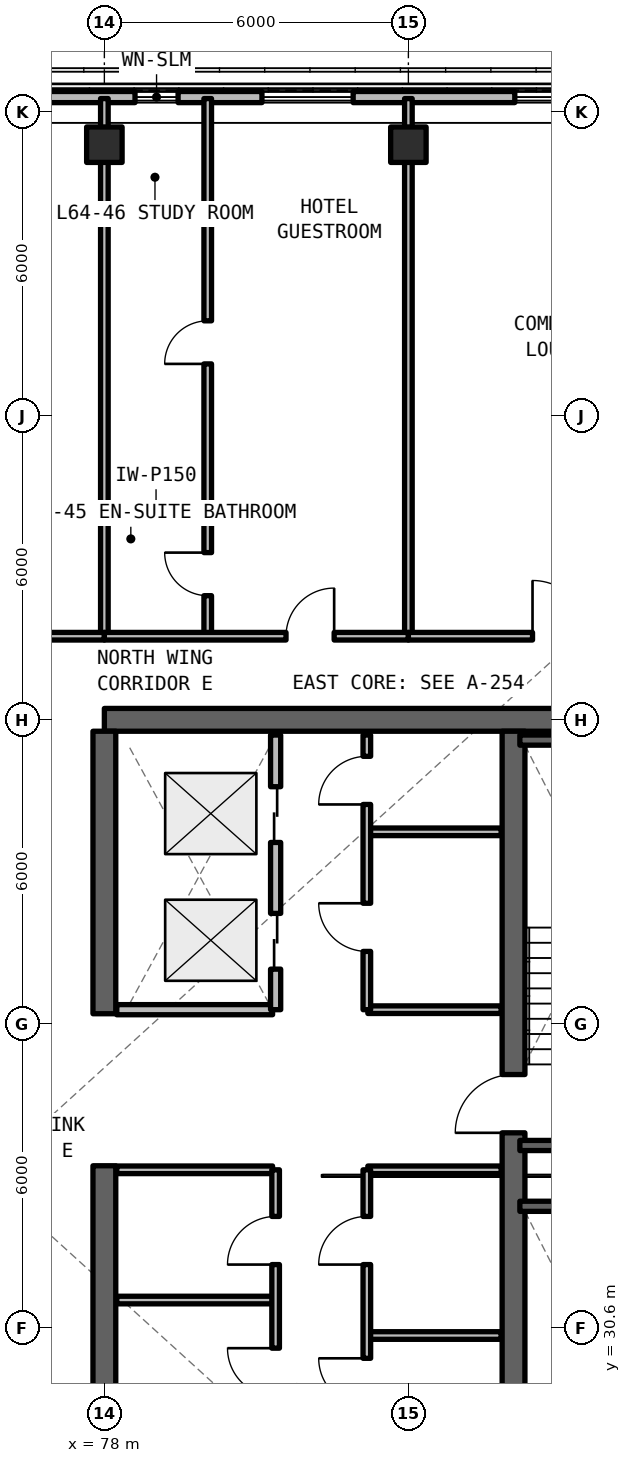
"""IFC4 building model, lengths in metres.
Left out: names, types, materials, properties, quantities, classifications, styles, units other than length and angle.
Written with IfcOpenShell. Run it as: python <this file> out.ifc"""

import sys

from ifc_helpers import new_model, si_unit, direction, frame, frame_2d, origin, origin_2d, place, context, subcontext, project, spatial, rectangle, extrude, element, fill, save


model = new_model("IFC4")
c1 = context("Model", 3, precision=1e-05, world=origin(), true_north=direction((0.0, 1.0)))
c2 = subcontext(c1, "Body", "Model", "MODEL_VIEW")
j1 = project(units=[si_unit("LENGTHUNIT", "METRE"), si_unit("PLANEANGLEUNIT", "RADIAN")], contexts=[c1])
p1 = place(None, origin())
s1 = spatial("IfcSite", under=j1, at=p1, CompositionType="ELEMENT")
p2 = place(p1, origin())
s2 = spatial("IfcBuilding", under=s1, at=p2, CompositionType="ELEMENT")
p3 = place(p2, frame((0.0, 0.0, 229.35)))
s3 = spatial("IfcBuildingStorey", under=s2, at=p3, CompositionType="ELEMENT", Elevation=229.35)
p4 = place(p3, frame((90.0, 42.6, 0.0), z_axis=(0.0, 0.0, 1.0), x_axis=(-1.0, 0.0, 0.0)))
e1 = element("IfcWall", 1, at=p4, inside=s3, PredefinedType="SHEAR", context=c2, shape_type="SweptSolid", body=[
    extrude(rectangle(XDim=12.0, YDim=0.45, at=frame_2d((6.0, 0.0))), origin(), (0.0, 0.0, 1.0), 3.3),
])
p5 = place(p3, frame((78.0, 24.825, 0.0), z_axis=(0.0, 0.0, 1.0), x_axis=(0.0, 1.0, 0.0)))
e2 = element("IfcWall", 2, at=p5, inside=s3, PredefinedType="SHEAR", context=c2, shape_type="SweptSolid", body=[
    extrude(rectangle(XDim=8.975, YDim=0.45, at=frame_2d((4.488, 0.0))), origin(), (0.0, 0.0, 1.0), 3.3),
])
p6 = place(p3, frame((78.0, 36.8, 0.0), z_axis=(0.0, 0.0, 1.0), x_axis=(0.0, 1.0, 0.0)))
e3 = element("IfcWall", 3, at=p6, inside=s3, PredefinedType="SHEAR", context=c2, shape_type="SweptSolid", body=[
    extrude(rectangle(XDim=5.575, YDim=0.45, at=frame_2d((2.788, 0.0))), origin(), (0.0, 0.0, 1.0), 3.3),
])
p7 = place(p3, frame((86.075, 24.825, 0.0), z_axis=(0.0, 0.0, 1.0), x_axis=(0.0, 1.0, 0.0)))
e4 = element("IfcWall", 4, at=p7, inside=s3, PredefinedType="SHEAR", context=c2, shape_type="SweptSolid", body=[
    extrude(rectangle(XDim=17.55, YDim=0.45, at=frame_2d((8.775, 0.0))), origin(), (0.0, 0.0, 1.0), 3.3),
])
p8 = place(p7, frame((0.425, 0.0, 0.0)))
e5 = element("IfcOpeningElement", 5, at=p8, cuts=e4, PredefinedType="OPENING", context=c2, shape_type="SweptSolid", body=[
    extrude(rectangle(XDim=1.15, YDim=2.15, at=frame_2d((0.575, 1.075))), frame((0.0, 0.235, 0.0), z_axis=(0.0, -1.0, 0.0), x_axis=(1.0, 0.0, 0.0)), (0.0, 0.0, 1.0), 0.47),
])
p9 = place(p7, frame((9.625, 0.0, 0.0)))
e6 = element("IfcOpeningElement", 6, at=p9, cuts=e4, PredefinedType="OPENING", context=c2, shape_type="SweptSolid", body=[
    extrude(rectangle(XDim=1.15, YDim=2.15, at=frame_2d((0.575, 1.075))), frame((0.0, 0.235, 0.0), z_axis=(0.0, -1.0, 0.0), x_axis=(1.0, 0.0, 0.0)), (0.0, 0.0, 1.0), 0.47),
])
for number, where, z_axis, x_axis in (
    (7, (78.0, 53.95, 0.0), (0.0, 0.0, 1.0), (1.0, 0.0, 0.0)),
    (8, (84.0, 53.95, 0.0), (0.0, 0.0, 1.0), (1.0, 0.0, 0.0)),
):
    element("IfcColumn", number, at=place(p3, frame(where, z_axis=z_axis, x_axis=x_axis)), inside=s3, PredefinedType="COLUMN", context=c2, shape_type="SweptSolid", body=[
        extrude(rectangle(XDim=0.7, YDim=0.7, at=origin_2d()), origin(), (0.0, 0.0, 1.0), 3.3),
    ])
p10 = place(p3, frame((94.754, 54.89, 0.0), z_axis=(0.0, 0.0, 1.0), x_axis=(-1.0, 0.0, 0.0)))
e9 = element("IfcWall", 9, at=p10, inside=s3, PredefinedType="SOLIDWALL", context=c2, shape_type="SweptSolid", body=[
    extrude(rectangle(XDim=23.609, YDim=0.22, at=frame_2d((11.804, 0.0))), origin(), (0.0, 0.0, 1.0), 3.08),
])
p11 = place(p10, frame((1.427, 0.0, 0.78)))
e10 = element("IfcOpeningElement", 10, at=p11, cuts=e9, PredefinedType="OPENING", context=c2, shape_type="SweptSolid", body=[
    extrude(rectangle(XDim=1.8, YDim=1.66, at=frame_2d((0.9, 0.83))), frame((0.0, 0.12, 0.0), z_axis=(0.0, -1.0, 0.0), x_axis=(1.0, 0.0, 0.0)), (0.0, 0.0, 1.0), 0.24),
])
p12 = place(p10, frame((18.854, 0.0, 0.78)))
e11 = element("IfcOpeningElement", 11, at=p12, cuts=e9, PredefinedType="OPENING", context=c2, shape_type="SweptSolid", body=[
    extrude(rectangle(XDim=1.8, YDim=1.66, at=frame_2d((0.9, 0.83))), frame((0.0, 0.12, 0.0), z_axis=(0.0, -1.0, 0.0), x_axis=(1.0, 0.0, 0.0)), (0.0, 0.0, 1.0), 0.24),
])
p13 = place(p10, frame((15.299, 0.0, 0.78)))
e12 = element("IfcOpeningElement", 12, at=p13, cuts=e9, PredefinedType="OPENING", context=c2, shape_type="SweptSolid", body=[
    extrude(rectangle(XDim=0.85, YDim=1.65, at=frame_2d((0.425, 0.825))), frame((0.0, 0.12, 0.0), z_axis=(0.0, -1.0, 0.0), x_axis=(1.0, 0.0, 0.0)), (0.0, 0.0, 1.0), 0.24),
])
p14 = place(p10, frame((11.844, 0.0, 0.78)))
e13 = element("IfcOpeningElement", 13, at=p14, cuts=e9, PredefinedType="OPENING", context=c2, shape_type="SweptSolid", body=[
    extrude(rectangle(XDim=1.8, YDim=1.66, at=frame_2d((0.9, 0.83))), frame((0.0, 0.12, 0.0), z_axis=(0.0, -1.0, 0.0), x_axis=(1.0, 0.0, 0.0)), (0.0, 0.0, 1.0), 0.24),
])
p15 = place(p10, frame((6.854, 0.0, 0.78)))
e14 = element("IfcOpeningElement", 14, at=p15, cuts=e9, PredefinedType="OPENING", context=c2, shape_type="SweptSolid", body=[
    extrude(rectangle(XDim=1.8, YDim=1.66, at=frame_2d((0.9, 0.83))), frame((0.0, 0.12, 0.0), z_axis=(0.0, -1.0, 0.0), x_axis=(1.0, 0.0, 0.0)), (0.0, 0.0, 1.0), 0.24),
])
for number, where, z_axis, x_axis in (
    (15, (83.2, 30.45, 0.0), (0.0, 0.0, 1.0), (1.0, 0.0, 0.0)),
    (16, (83.2, 33.72, 0.0), (0.0, 0.0, 1.0), (1.0, 0.0, 0.0)),
):
    element("IfcWall", number, at=place(p3, frame(where, z_axis=z_axis, x_axis=x_axis)), inside=s3, PredefinedType="SOLIDWALL", context=c2, shape_type="SweptSolid", body=[
        extrude(rectangle(XDim=2.63, YDim=0.15, at=frame_2d((1.315, 0.0))), origin(), (0.0, 0.0, 1.0), 2.35),
    ])
p16 = place(p3, frame((83.18, 28.5, 0.0), z_axis=(0.0, 0.0, 1.0), x_axis=(0.0, 1.0, 0.0)))
e17 = element("IfcWall", 17, at=p16, inside=s3, PredefinedType="SOLIDWALL", context=c2, shape_type="SweptSolid", body=[
    extrude(rectangle(XDim=5.22, YDim=0.15, at=frame_2d((2.61, 0.0))), origin(), (0.0, 0.0, 1.0), 2.35),
])
p17 = place(p16, frame((0.55, 0.0, 0.0)))
e18 = element("IfcOpeningElement", 18, at=p17, cuts=e17, PredefinedType="OPENING", context=c2, shape_type="SweptSolid", body=[
    extrude(rectangle(XDim=0.95, YDim=2.15, at=frame_2d((0.475, 1.075))), frame((0.0, 0.085, 0.0), z_axis=(0.0, -1.0, 0.0), x_axis=(1.0, 0.0, 0.0)), (0.0, 0.0, 1.0), 0.17),
])
p18 = place(p16, frame((3.35, 0.0, 0.0)))
e19 = element("IfcOpeningElement", 19, at=p18, cuts=e17, PredefinedType="OPENING", context=c2, shape_type="SweptSolid", body=[
    extrude(rectangle(XDim=0.95, YDim=2.15, at=frame_2d((0.475, 1.075))), frame((0.0, 0.085, 0.0), z_axis=(0.0, -1.0, 0.0), x_axis=(1.0, 0.0, 0.0)), (0.0, 0.0, 1.0), 0.17),
])
for number, where, z_axis, x_axis in (
    (20, (78.245, 31.15, 0.0), (0.0, 0.0, 1.0), (1.0, 0.0, 0.0)),
    (21, (78.245, 33.72, 0.0), (0.0, 0.0, 1.0), (1.0, 0.0, 0.0)),
):
    element("IfcWall", number, at=place(p3, frame(where, z_axis=z_axis, x_axis=x_axis)), inside=s3, PredefinedType="SOLIDWALL", context=c2, shape_type="SweptSolid", body=[
        extrude(rectangle(XDim=3.075, YDim=0.15, at=frame_2d((1.538, 0.0))), origin(), (0.0, 0.0, 1.0), 2.35),
    ])
p19 = place(p3, frame((81.38, 28.5, 0.0), z_axis=(0.0, 0.0, 1.0), x_axis=(0.0, 1.0, 0.0)))
e22 = element("IfcWall", 22, at=p19, inside=s3, PredefinedType="SOLIDWALL", context=c2, shape_type="SweptSolid", body=[
    extrude(rectangle(XDim=5.22, YDim=0.15, at=frame_2d((2.61, 0.0))), origin(), (0.0, 0.0, 1.0), 2.35),
])
p20 = place(p19, frame((0.75, 0.0, 0.0)))
e23 = element("IfcOpeningElement", 23, at=p20, cuts=e22, PredefinedType="OPENING", context=c2, shape_type="SweptSolid", body=[
    extrude(rectangle(XDim=0.95, YDim=2.15, at=frame_2d((0.475, 1.075))), frame((0.0, 0.085, 0.0), z_axis=(0.0, -1.0, 0.0), x_axis=(1.0, 0.0, 0.0)), (0.0, 0.0, 1.0), 0.17),
])
p21 = place(p19, frame((3.35, 0.0, 0.0)))
e24 = element("IfcOpeningElement", 24, at=p21, cuts=e22, PredefinedType="OPENING", context=c2, shape_type="SweptSolid", body=[
    extrude(rectangle(XDim=0.95, YDim=2.15, at=frame_2d((0.475, 1.075))), frame((0.0, 0.085, 0.0), z_axis=(0.0, -1.0, 0.0), x_axis=(1.0, 0.0, 0.0)), (0.0, 0.0, 1.0), 0.17),
])
for number, where, z_axis, x_axis in (
    (25, (83.2, 36.88, 0.0), (0.0, 0.0, 1.0), (1.0, 0.0, 0.0)),
    (26, (83.2, 40.39, 0.0), (0.0, 0.0, 1.0), (1.0, 0.0, 0.0)),
):
    element("IfcWall", number, at=place(p3, frame(where, z_axis=z_axis, x_axis=x_axis)), inside=s3, PredefinedType="SOLIDWALL", context=c2, shape_type="SweptSolid", body=[
        extrude(rectangle(XDim=2.63, YDim=0.15, at=frame_2d((1.315, 0.0))), origin(), (0.0, 0.0, 1.0), 2.35),
    ])
p22 = place(p3, frame((83.18, 36.88, 0.0), z_axis=(0.0, 0.0, 1.0), x_axis=(0.0, 1.0, 0.0)))
e27 = element("IfcWall", 27, at=p22, inside=s3, PredefinedType="SOLIDWALL", context=c2, shape_type="SweptSolid", body=[
    extrude(rectangle(XDim=5.42, YDim=0.15, at=frame_2d((2.71, 0.0))), origin(), (0.0, 0.0, 1.0), 2.35),
])
p23 = place(p22, frame((1.15, 0.0, 0.0)))
e28 = element("IfcOpeningElement", 28, at=p23, cuts=e27, PredefinedType="OPENING", context=c2, shape_type="SweptSolid", body=[
    extrude(rectangle(XDim=0.95, YDim=2.15, at=frame_2d((0.475, 1.075))), frame((0.0, 0.085, 0.0), z_axis=(0.0, -1.0, 0.0), x_axis=(1.0, 0.0, 0.0)), (0.0, 0.0, 1.0), 0.17),
])
p24 = place(p22, frame((4.05, 0.0, 0.0)))
e29 = element("IfcOpeningElement", 29, at=p24, cuts=e27, PredefinedType="OPENING", context=c2, shape_type="SweptSolid", body=[
    extrude(rectangle(XDim=0.95, YDim=2.15, at=frame_2d((0.475, 1.075))), frame((0.0, 0.085, 0.0), z_axis=(0.0, -1.0, 0.0), x_axis=(1.0, 0.0, 0.0)), (0.0, 0.0, 1.0), 0.17),
])
p25 = place(p3, frame((78.245, 36.88, 0.0), z_axis=(0.0, 0.0, 1.0), x_axis=(1.0, 0.0, 0.0)))
e30 = element("IfcWall", 30, at=p25, inside=s3, PredefinedType="SOLIDWALL", context=c2, shape_type="SweptSolid", body=[
    extrude(rectangle(XDim=3.075, YDim=0.2, at=frame_2d((1.538, 0.0))), origin(), (0.0, 0.0, 1.0), 2.35),
])
p26 = place(p3, frame((81.38, 36.88, 0.0), z_axis=(0.0, 0.0, 1.0), x_axis=(0.0, 1.0, 0.0)))
e31 = element("IfcWall", 31, at=p26, inside=s3, PredefinedType="SOLIDWALL", context=c2, shape_type="SweptSolid", body=[
    extrude(rectangle(XDim=5.42, YDim=0.2, at=frame_2d((2.71, 0.0))), origin(), (0.0, 0.0, 1.0), 2.35),
])
p27 = place(p26, frame((0.8, 0.0, 0.0)))
e32 = element("IfcOpeningElement", 32, at=p27, cuts=e31, PredefinedType="OPENING", context=c2, shape_type="SweptSolid", body=[
    extrude(rectangle(XDim=1.1, YDim=2.2, at=frame_2d((0.55, 1.1))), frame((0.0, 0.11, 0.0), z_axis=(0.0, -1.0, 0.0), x_axis=(1.0, 0.0, 0.0)), (0.0, 0.0, 1.0), 0.22),
])
p28 = place(p26, frame((3.3, 0.0, 0.0)))
e33 = element("IfcOpeningElement", 33, at=p28, cuts=e31, PredefinedType="OPENING", context=c2, shape_type="SweptSolid", body=[
    extrude(rectangle(XDim=1.1, YDim=2.2, at=frame_2d((0.55, 1.1))), frame((0.0, 0.11, 0.0), z_axis=(0.0, -1.0, 0.0), x_axis=(1.0, 0.0, 0.0)), (0.0, 0.0, 1.0), 0.22),
])
p29 = place(p3, frame((78.0, 44.25, 0.0), z_axis=(0.0, 0.0, 1.0), x_axis=(0.0, 1.0, 0.0)))
e34 = element("IfcWall", 34, at=p29, inside=s3, PredefinedType="SOLIDWALL", context=c2, shape_type="SweptSolid", body=[
    extrude(rectangle(XDim=10.61, YDim=0.15, at=frame_2d((5.305, 0.0))), origin(), (0.0, 0.0, 1.0), 2.35),
])
p30 = place(p3, frame((72.0, 44.25, 0.0), z_axis=(0.0, 0.0, 1.0), x_axis=(1.0, 0.0, 0.0)))
e35 = element("IfcWall", 35, at=p30, inside=s3, PredefinedType="SOLIDWALL", context=c2, shape_type="SweptSolid", body=[
    extrude(rectangle(XDim=6.0, YDim=0.15, at=frame_2d((3.0, 0.0))), origin(), (0.0, 0.0, 1.0), 2.35),
])
p31 = place(p30, frame((2.525, 0.0, 0.0)))
e36 = element("IfcOpeningElement", 36, at=p31, cuts=e35, PredefinedType="OPENING", context=c2, shape_type="SweptSolid", body=[
    extrude(rectangle(XDim=0.95, YDim=2.15, at=frame_2d((0.475, 1.075))), frame((0.0, 0.085, 0.0), z_axis=(0.0, -1.0, 0.0), x_axis=(1.0, 0.0, 0.0)), (0.0, 0.0, 1.0), 0.17),
])
p32 = place(p3, frame((84.0, 44.25, 0.0), z_axis=(0.0, 0.0, 1.0), x_axis=(0.0, 1.0, 0.0)))
e37 = element("IfcWall", 37, at=p32, inside=s3, PredefinedType="SOLIDWALL", context=c2, shape_type="SweptSolid", body=[
    extrude(rectangle(XDim=10.61, YDim=0.15, at=frame_2d((5.305, 0.0))), origin(), (0.0, 0.0, 1.0), 2.35),
])
p33 = place(p3, frame((78.0, 46.7, 0.0), z_axis=(0.0, 0.0, 1.0), x_axis=(1.0, 0.0, 0.0)))
e38 = element("IfcWall", 38, at=p33, inside=s3, PredefinedType="PARTITIONING", context=c2, shape_type="SweptSolid", body=[
    extrude(rectangle(XDim=2.04, YDim=0.15, at=frame_2d((1.02, 0.0))), origin(), (0.0, 0.0, 1.0), 2.35),
])
p34 = place(p3, frame((80.04, 44.25, 0.0), z_axis=(0.0, 0.0, 1.0), x_axis=(0.0, 1.0, 0.0)))
e39 = element("IfcWall", 39, at=p34, inside=s3, PredefinedType="PARTITIONING", context=c2, shape_type="SweptSolid", body=[
    extrude(rectangle(XDim=10.61, YDim=0.15, at=frame_2d((5.305, 0.0))), origin(), (0.0, 0.0, 1.0), 2.35),
])
p35 = place(p34, frame((0.8, 0.0, 0.0)))
e40 = element("IfcOpeningElement", 40, at=p35, cuts=e39, PredefinedType="OPENING", context=c2, shape_type="SweptSolid", body=[
    extrude(rectangle(XDim=0.85, YDim=2.1, at=frame_2d((0.425, 1.05))), frame((0.0, 0.085, 0.0), z_axis=(0.0, -1.0, 0.0), x_axis=(1.0, 0.0, 0.0)), (0.0, 0.0, 1.0), 0.17),
])
p36 = place(p34, frame((5.374, 0.0, 0.0)))
e41 = element("IfcOpeningElement", 41, at=p36, cuts=e39, PredefinedType="OPENING", context=c2, shape_type="SweptSolid", body=[
    extrude(rectangle(XDim=0.85, YDim=2.1, at=frame_2d((0.425, 1.05))), frame((0.0, 0.085, 0.0), z_axis=(0.0, -1.0, 0.0), x_axis=(1.0, 0.0, 0.0)), (0.0, 0.0, 1.0), 0.17),
])
p37 = place(p3, frame((78.0, 44.25, 0.0), z_axis=(0.0, 0.0, 1.0), x_axis=(1.0, 0.0, 0.0)))
e42 = element("IfcWall", 42, at=p37, inside=s3, PredefinedType="SOLIDWALL", context=c2, shape_type="SweptSolid", body=[
    extrude(rectangle(XDim=6.0, YDim=0.15, at=frame_2d((3.0, 0.0))), origin(), (0.0, 0.0, 1.0), 2.35),
])
p38 = place(p37, frame((3.585, 0.0, 0.0)))
e43 = element("IfcOpeningElement", 43, at=p38, cuts=e42, PredefinedType="OPENING", context=c2, shape_type="SweptSolid", body=[
    extrude(rectangle(XDim=0.95, YDim=2.15, at=frame_2d((0.475, 1.075))), frame((0.0, 0.085, 0.0), z_axis=(0.0, -1.0, 0.0), x_axis=(1.0, 0.0, 0.0)), (0.0, 0.0, 1.0), 0.17),
])
p39 = place(p3, frame((84.0, 44.25, 0.0), z_axis=(0.0, 0.0, 1.0), x_axis=(1.0, 0.0, 0.0)))
e44 = element("IfcWall", 44, at=p39, inside=s3, PredefinedType="SOLIDWALL", context=c2, shape_type="SweptSolid", body=[
    extrude(rectangle(XDim=6.0, YDim=0.15, at=frame_2d((3.0, 0.0))), origin(), (0.0, 0.0, 1.0), 2.35),
])
p40 = place(p39, frame((2.45, 0.0, 0.0)))
e45 = element("IfcOpeningElement", 45, at=p40, cuts=e44, PredefinedType="OPENING", context=c2, shape_type="SweptSolid", body=[
    extrude(rectangle(XDim=1.1, YDim=2.15, at=frame_2d((0.55, 1.075))), frame((0.0, 0.085, 0.0), z_axis=(0.0, -1.0, 0.0), x_axis=(1.0, 0.0, 0.0)), (0.0, 0.0, 1.0), 0.17),
])
for number, where, z_axis, x_axis in (
    (46, (89.6, 33.0, 0.0), (0.0, 0.0, 1.0), (-1.0, 0.0, 0.0)),
    (47, (86.2, 34.2, 0.0), (0.0, 0.0, 1.0), (1.0, 0.0, 0.0)),
    (48, (89.6, 42.2, 0.0), (0.0, 0.0, 1.0), (-1.0, 0.0, 0.0)),
):
    element("IfcWall", number, at=place(p3, frame(where, z_axis=z_axis, x_axis=x_axis)), inside=s3, PredefinedType="SOLIDWALL", context=c2, shape_type="SweptSolid", body=[
        extrude(rectangle(XDim=3.4, YDim=0.2, at=frame_2d((1.7, 0.0))), origin(), (0.0, 0.0, 1.0), 3.3),
    ])
p41 = place(p13, origin())
e49 = element("IfcWindow", 49, at=p41, inside=s3, PartitioningType="SINGLE_PANEL", PredefinedType="WINDOW", context=c2, shape_type="SweptSolid", body=[
    extrude(rectangle(XDim=0.85, YDim=1.65, at=frame_2d((0.425, 0.825))), frame((0.0, 0.03, 0.0), z_axis=(0.0, -1.0, 0.0), x_axis=(1.0, 0.0, 0.0)), (0.0, 0.0, 1.0), 0.06),
])
fill(e12, e49)
p42 = place(p14, origin())
e50 = element("IfcWindow", 50, at=p42, inside=s3, PartitioningType="SINGLE_PANEL", PredefinedType="WINDOW", context=c2, shape_type="SweptSolid", body=[
    extrude(rectangle(XDim=1.8, YDim=1.66, at=frame_2d((0.9, 0.83))), frame((0.0, 0.03, 0.0), z_axis=(0.0, -1.0, 0.0), x_axis=(1.0, 0.0, 0.0)), (0.0, 0.0, 1.0), 0.06),
])
fill(e13, e50)
p43 = place(p15, origin())
e51 = element("IfcWindow", 51, at=p43, inside=s3, PartitioningType="SINGLE_PANEL", PredefinedType="WINDOW", context=c2, shape_type="SweptSolid", body=[
    extrude(rectangle(XDim=1.8, YDim=1.66, at=frame_2d((0.9, 0.83))), frame((0.0, 0.03, 0.0), z_axis=(0.0, -1.0, 0.0), x_axis=(1.0, 0.0, 0.0)), (0.0, 0.0, 1.0), 0.06),
])
fill(e14, e51)
p44 = place(p17, origin())
e52 = element("IfcDoor", 52, at=p44, inside=s3, OperationType="SINGLE_SWING_RIGHT", PredefinedType="DOOR", context=c2, shape_type="SweptSolid", body=[
    extrude(rectangle(XDim=0.95, YDim=2.15, at=frame_2d((0.475, 1.075))), frame((0.0, 0.025, 0.0), z_axis=(0.0, -1.0, 0.0), x_axis=(1.0, 0.0, 0.0)), (0.0, 0.0, 1.0), 0.05),
])
fill(e18, e52)
p45 = place(p18, origin())
e53 = element("IfcDoor", 53, at=p45, inside=s3, OperationType="SINGLE_SWING_LEFT", PredefinedType="DOOR", context=c2, shape_type="SweptSolid", body=[
    extrude(rectangle(XDim=0.95, YDim=2.15, at=frame_2d((0.475, 1.075))), frame((0.0, 0.025, 0.0), z_axis=(0.0, -1.0, 0.0), x_axis=(1.0, 0.0, 0.0)), (0.0, 0.0, 1.0), 0.05),
])
fill(e19, e53)
p46 = place(p20, origin())
e54 = element("IfcDoor", 54, at=p46, inside=s3, OperationType="SINGLE_SWING_RIGHT", PredefinedType="DOOR", context=c2, shape_type="SweptSolid", body=[
    extrude(rectangle(XDim=0.95, YDim=2.15, at=frame_2d((0.475, 1.075))), frame((0.0, 0.025, 0.0), z_axis=(0.0, -1.0, 0.0), x_axis=(1.0, 0.0, 0.0)), (0.0, 0.0, 1.0), 0.05),
])
fill(e23, e54)
p47 = place(p21, origin())
e55 = element("IfcDoor", 55, at=p47, inside=s3, OperationType="SINGLE_SWING_LEFT", PredefinedType="DOOR", context=c2, shape_type="SweptSolid", body=[
    extrude(rectangle(XDim=0.95, YDim=2.15, at=frame_2d((0.475, 1.075))), frame((0.0, 0.025, 0.0), z_axis=(0.0, -1.0, 0.0), x_axis=(1.0, 0.0, 0.0)), (0.0, 0.0, 1.0), 0.05),
])
fill(e24, e55)
p48 = place(p23, origin())
e56 = element("IfcDoor", 56, at=p48, inside=s3, OperationType="SINGLE_SWING_RIGHT", PredefinedType="DOOR", context=c2, shape_type="SweptSolid", body=[
    extrude(rectangle(XDim=0.95, YDim=2.15, at=frame_2d((0.475, 1.075))), frame((0.0, 0.025, 0.0), z_axis=(0.0, -1.0, 0.0), x_axis=(1.0, 0.0, 0.0)), (0.0, 0.0, 1.0), 0.05),
])
fill(e28, e56)
p49 = place(p24, origin())
e57 = element("IfcDoor", 57, at=p49, inside=s3, OperationType="SINGLE_SWING_LEFT", PredefinedType="DOOR", context=c2, shape_type="SweptSolid", body=[
    extrude(rectangle(XDim=0.95, YDim=2.15, at=frame_2d((0.475, 1.075))), frame((0.0, 0.025, 0.0), z_axis=(0.0, -1.0, 0.0), x_axis=(1.0, 0.0, 0.0)), (0.0, 0.0, 1.0), 0.05),
])
fill(e29, e57)
p50 = place(p27, origin())
e58 = element("IfcDoor", 58, at=p50, inside=s3, OperationType="SLIDING_TO_LEFT", PredefinedType="DOOR", context=c2, shape_type="SweptSolid", body=[
    extrude(rectangle(XDim=1.1, YDim=2.2, at=frame_2d((0.55, 1.1))), frame((0.0, 0.025, 0.0), z_axis=(0.0, -1.0, 0.0), x_axis=(1.0, 0.0, 0.0)), (0.0, 0.0, 1.0), 0.05),
])
fill(e32, e58)
p51 = place(p28, origin())
e59 = element("IfcDoor", 59, at=p51, inside=s3, OperationType="SLIDING_TO_RIGHT", PredefinedType="DOOR", context=c2, shape_type="SweptSolid", body=[
    extrude(rectangle(XDim=1.1, YDim=2.2, at=frame_2d((0.55, 1.1))), frame((0.0, 0.025, 0.0), z_axis=(0.0, -1.0, 0.0), x_axis=(1.0, 0.0, 0.0)), (0.0, 0.0, 1.0), 0.05),
])
fill(e33, e59)
p52 = place(p35, origin())
e60 = element("IfcDoor", 60, at=p52, inside=s3, OperationType="SINGLE_SWING_RIGHT", PredefinedType="DOOR", context=c2, shape_type="SweptSolid", body=[
    extrude(rectangle(XDim=0.85, YDim=2.1, at=frame_2d((0.425, 1.05))), frame((0.0, 0.025, 0.0), z_axis=(0.0, -1.0, 0.0), x_axis=(1.0, 0.0, 0.0)), (0.0, 0.0, 1.0), 0.05),
])
fill(e40, e60)
p53 = place(p36, origin())
e61 = element("IfcDoor", 61, at=p53, inside=s3, OperationType="SINGLE_SWING_LEFT", PredefinedType="DOOR", context=c2, shape_type="SweptSolid", body=[
    extrude(rectangle(XDim=0.85, YDim=2.1, at=frame_2d((0.425, 1.05))), frame((0.0, 0.025, 0.0), z_axis=(0.0, -1.0, 0.0), x_axis=(1.0, 0.0, 0.0)), (0.0, 0.0, 1.0), 0.05),
])
fill(e41, e61)
p54 = place(p38, origin())
e62 = element("IfcDoor", 62, at=p54, inside=s3, OperationType="SINGLE_SWING_RIGHT", PredefinedType="DOOR", context=c2, shape_type="SweptSolid", body=[
    extrude(rectangle(XDim=0.95, YDim=2.15, at=frame_2d((0.475, 1.075))), frame((0.0, 0.025, 0.0), z_axis=(0.0, -1.0, 0.0), x_axis=(1.0, 0.0, 0.0)), (0.0, 0.0, 1.0), 0.05),
])
fill(e43, e62)
p55 = place(p40, origin())
e63 = element("IfcDoor", 63, at=p55, inside=s3, OperationType="SINGLE_SWING_LEFT", PredefinedType="DOOR", context=c2, shape_type="SweptSolid", body=[
    extrude(rectangle(XDim=1.1, YDim=2.15, at=frame_2d((0.55, 1.075))), frame((0.0, 0.025, 0.0), z_axis=(0.0, -1.0, 0.0), x_axis=(1.0, 0.0, 0.0)), (0.0, 0.0, 1.0), 0.05),
])
fill(e45, e63)
p56 = place(p9, origin())
e64 = element("IfcDoor", 64, at=p56, inside=s3, OperationType="SINGLE_SWING_RIGHT", PredefinedType="DOOR", context=c2, shape_type="SweptSolid", body=[
    extrude(rectangle(XDim=1.15, YDim=2.15, at=frame_2d((0.575, 1.075))), frame((0.0, 0.025, 0.0), z_axis=(0.0, -1.0, 0.0), x_axis=(1.0, 0.0, 0.0)), (0.0, 0.0, 1.0), 0.05),
])
fill(e6, e64)
save(model, sys.argv[1])
